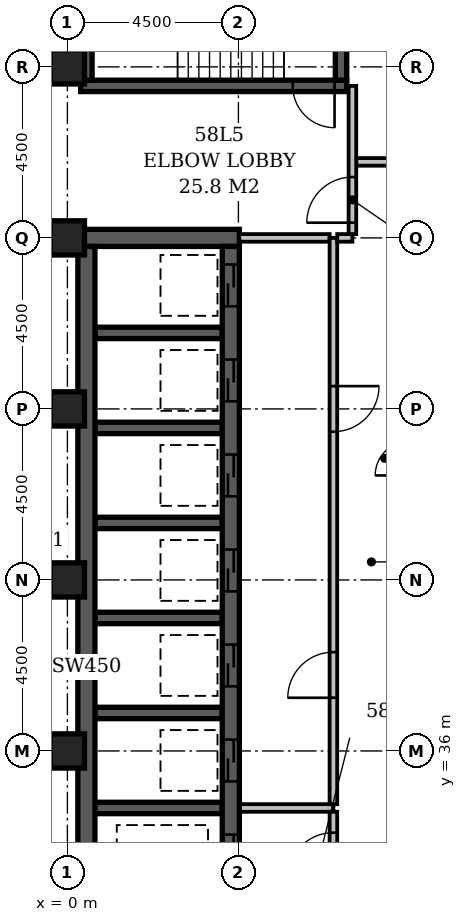
"""IFC4 building model, lengths in metres.
Left out: names, types, materials, properties, quantities, classifications, styles, units other than length and angle.
Written with IfcOpenShell. Run it as: python <this file> out.ifc"""

import sys

from ifc_helpers import new_model, si_unit, direction, frame, frame_2d, origin, origin_2d, place, context, subcontext, project, spatial, rectangle, extrude, element, fill, save


model = new_model("IFC4")
c1 = context("Model", 3, precision=1e-05, world=origin(), true_north=direction((0.0, 1.0)))
c2 = subcontext(c1, "Body", "Model", "MODEL_VIEW")
j1 = project(units=[si_unit("LENGTHUNIT", "METRE"), si_unit("PLANEANGLEUNIT", "RADIAN")], contexts=[c1])
p1 = place(None, origin())
s1 = spatial("IfcSite", under=j1, at=p1, CompositionType="ELEMENT")
p2 = place(p1, origin())
s2 = spatial("IfcBuilding", under=s1, at=p2, CompositionType="ELEMENT")
p3 = place(p2, frame((0.0, 0.0, 225.8)))
s3 = spatial("IfcBuildingStorey", under=s2, at=p3, CompositionType="ELEMENT", Elevation=225.8)
p4 = place(p3, frame((0.275, 49.5, -0.3), z_axis=(0.0, 0.0, 1.0), x_axis=(1.0, 0.0, 0.0)))
e1 = element("IfcWall", 1, at=p4, inside=s3, PredefinedType="SHEAR", context=c2, shape_type="SweptSolid", body=[
    extrude(rectangle(XDim=4.25, YDim=0.45, at=frame_2d((2.125, 0.0))), origin(), (0.0, 0.0, 1.0), 3.6),
])
p5 = place(p3, frame((0.35, 53.5, -0.3), z_axis=(0.0, 0.0, 1.0), x_axis=(1.0, 0.0, 0.0)))
e2 = element("IfcWall", 2, at=p5, inside=s3, PredefinedType="SHEAR", context=c2, shape_type="SweptSolid", body=[
    extrude(rectangle(XDim=7.0, YDim=0.3, at=frame_2d((3.5, 0.0))), origin(), (0.0, 0.0, 1.0), 3.6),
])
p6 = place(p5, frame((5.58, 0.0, 0.3)))
e3 = element("IfcOpeningElement", 3, at=p6, cuts=e2, PredefinedType="OPENING", context=c2, shape_type="SweptSolid", body=[
    extrude(rectangle(XDim=1.1, YDim=2.1, at=frame_2d((0.55, 1.05))), frame((0.0, 0.162, 0.0), z_axis=(0.0, -1.0, 0.0), x_axis=(1.0, 0.0, 0.0)), (0.0, 0.0, 1.0), 0.324),
])
p7 = place(p3, frame((0.5, 27.15, -0.3), z_axis=(0.0, 0.0, 1.0), x_axis=(0.0, 1.0, 0.0)))
e4 = element("IfcWall", 4, at=p7, inside=s3, PredefinedType="SHEAR", context=c2, shape_type="SweptSolid", body=[
    extrude(rectangle(XDim=22.125, YDim=0.45, at=frame_2d((11.062, 0.0))), origin(), (0.0, 0.0, 1.0), 3.6),
])
p8 = place(p3, frame((0.5, 53.65, -0.3), z_axis=(0.0, 0.0, 1.0), x_axis=(0.0, 1.0, 0.0)))
e5 = element("IfcWall", 5, at=p8, inside=s3, PredefinedType="SHEAR", context=c2, shape_type="SweptSolid", body=[
    extrude(rectangle(XDim=4.2, YDim=0.3, at=frame_2d((2.1, 0.0))), origin(), (0.0, 0.0, 1.0), 3.6),
])
for number, where, z_axis, x_axis in (
    (6, (0.725, 34.5, -0.3), (0.0, 0.0, 1.0), (1.0, 0.0, 0.0)),
    (7, (0.725, 37.0, -0.3), (0.0, 0.0, 1.0), (1.0, 0.0, 0.0)),
    (8, (0.725, 39.5, -0.3), (0.0, 0.0, 1.0), (1.0, 0.0, 0.0)),
    (9, (0.725, 42.0, -0.3), (0.0, 0.0, 1.0), (1.0, 0.0, 0.0)),
    (10, (0.725, 44.5, -0.3), (0.0, 0.0, 1.0), (1.0, 0.0, 0.0)),
    (11, (0.725, 47.0, -0.3), (0.0, 0.0, 1.0), (1.0, 0.0, 0.0)),
):
    element("IfcWall", number, at=place(p3, frame(where, z_axis=z_axis, x_axis=x_axis)), inside=s3, PredefinedType="SHEAR", context=c2, shape_type="SweptSolid", body=[
        extrude(rectangle(XDim=3.35, YDim=0.3, at=frame_2d((1.675, 0.0))), origin(), (0.0, 0.0, 1.0), 3.6),
    ])
p9 = place(p3, frame((4.3, 27.15, -0.3), z_axis=(0.0, 0.0, 1.0), x_axis=(0.0, 1.0, 0.0)))
e12 = element("IfcWall", 12, at=p9, inside=s3, PredefinedType="SHEAR", context=c2, shape_type="SweptSolid", body=[
    extrude(rectangle(XDim=22.125, YDim=0.45, at=frame_2d((11.062, 0.0))), origin(), (0.0, 0.0, 1.0), 3.6),
])
p10 = place(p9, frame((3.05, 0.0, 0.3)))
e13 = element("IfcOpeningElement", 13, at=p10, cuts=e12, PredefinedType="OPENING", context=c2, shape_type="SweptSolid", body=[
    extrude(rectangle(XDim=1.1, YDim=2.1, at=frame_2d((0.55, 1.05))), frame((0.0, 0.237, 0.0), z_axis=(0.0, -1.0, 0.0), x_axis=(1.0, 0.0, 0.0)), (0.0, 0.0, 1.0), 0.474),
])
p11 = place(p9, frame((0.55, 0.0, 0.3)))
e14 = element("IfcOpeningElement", 14, at=p11, cuts=e12, PredefinedType="OPENING", context=c2, shape_type="SweptSolid", body=[
    extrude(rectangle(XDim=1.1, YDim=2.1, at=frame_2d((0.55, 1.05))), frame((0.0, 0.237, 0.0), z_axis=(0.0, -1.0, 0.0), x_axis=(1.0, 0.0, 0.0)), (0.0, 0.0, 1.0), 0.474),
])
p12 = place(p9, frame((20.55, 0.0, 0.3)))
e15 = element("IfcOpeningElement", 15, at=p12, cuts=e12, PredefinedType="OPENING", context=c2, shape_type="SweptSolid", body=[
    extrude(rectangle(XDim=1.1, YDim=2.1, at=frame_2d((0.55, 1.05))), frame((0.0, 0.237, 0.0), z_axis=(0.0, -1.0, 0.0), x_axis=(1.0, 0.0, 0.0)), (0.0, 0.0, 1.0), 0.474),
])
p13 = place(p9, frame((18.05, 0.0, 0.3)))
e16 = element("IfcOpeningElement", 16, at=p13, cuts=e12, PredefinedType="OPENING", context=c2, shape_type="SweptSolid", body=[
    extrude(rectangle(XDim=1.1, YDim=2.1, at=frame_2d((0.55, 1.05))), frame((0.0, 0.237, 0.0), z_axis=(0.0, -1.0, 0.0), x_axis=(1.0, 0.0, 0.0)), (0.0, 0.0, 1.0), 0.474),
])
p14 = place(p9, frame((15.55, 0.0, 0.3)))
e17 = element("IfcOpeningElement", 17, at=p14, cuts=e12, PredefinedType="OPENING", context=c2, shape_type="SweptSolid", body=[
    extrude(rectangle(XDim=1.1, YDim=2.1, at=frame_2d((0.55, 1.05))), frame((0.0, 0.237, 0.0), z_axis=(0.0, -1.0, 0.0), x_axis=(1.0, 0.0, 0.0)), (0.0, 0.0, 1.0), 0.474),
])
p15 = place(p9, frame((13.05, 0.0, 0.3)))
e18 = element("IfcOpeningElement", 18, at=p15, cuts=e12, PredefinedType="OPENING", context=c2, shape_type="SweptSolid", body=[
    extrude(rectangle(XDim=1.1, YDim=2.1, at=frame_2d((0.55, 1.05))), frame((0.0, 0.237, 0.0), z_axis=(0.0, -1.0, 0.0), x_axis=(1.0, 0.0, 0.0)), (0.0, 0.0, 1.0), 0.474),
])
p16 = place(p9, frame((10.55, 0.0, 0.3)))
e19 = element("IfcOpeningElement", 19, at=p16, cuts=e12, PredefinedType="OPENING", context=c2, shape_type="SweptSolid", body=[
    extrude(rectangle(XDim=1.1, YDim=2.1, at=frame_2d((0.55, 1.05))), frame((0.0, 0.237, 0.0), z_axis=(0.0, -1.0, 0.0), x_axis=(1.0, 0.0, 0.0)), (0.0, 0.0, 1.0), 0.474),
])
p17 = place(p9, frame((8.05, 0.0, 0.3)))
e20 = element("IfcOpeningElement", 20, at=p17, cuts=e12, PredefinedType="OPENING", context=c2, shape_type="SweptSolid", body=[
    extrude(rectangle(XDim=1.1, YDim=2.1, at=frame_2d((0.55, 1.05))), frame((0.0, 0.237, 0.0), z_axis=(0.0, -1.0, 0.0), x_axis=(1.0, 0.0, 0.0)), (0.0, 0.0, 1.0), 0.474),
])
p18 = place(p9, frame((5.55, 0.0, 0.3)))
e21 = element("IfcOpeningElement", 21, at=p18, cuts=e12, PredefinedType="OPENING", context=c2, shape_type="SweptSolid", body=[
    extrude(rectangle(XDim=1.1, YDim=2.1, at=frame_2d((0.55, 1.05))), frame((0.0, 0.237, 0.0), z_axis=(0.0, -1.0, 0.0), x_axis=(1.0, 0.0, 0.0)), (0.0, 0.0, 1.0), 0.474),
])
p19 = place(p3, frame((7.2, 53.65, -0.3), z_axis=(0.0, 0.0, 1.0), x_axis=(0.0, 1.0, 0.0)))
e22 = element("IfcWall", 22, at=p19, inside=s3, PredefinedType="SHEAR", context=c2, shape_type="SweptSolid", body=[
    extrude(rectangle(XDim=4.2, YDim=0.3, at=frame_2d((2.1, 0.0))), origin(), (0.0, 0.0, 1.0), 3.6),
])
for number, where, z_axis, x_axis in (
    (23, (0.0, 36.0, -0.3), (0.0, 0.0, 1.0), (1.0, 0.0, 0.0)),
    (24, (0.0, 40.5, -0.3), (0.0, 0.0, 1.0), (1.0, 0.0, 0.0)),
    (25, (0.0, 45.0, -0.3), (0.0, 0.0, 1.0), (1.0, 0.0, 0.0)),
    (26, (0.0, 49.5, -0.3), (0.0, 0.0, 1.0), (1.0, 0.0, 0.0)),
    (27, (0.0, 54.0, -0.3), (0.0, 0.0, 1.0), (1.0, 0.0, 0.0)),
):
    element("IfcColumn", number, at=place(p3, frame(where, z_axis=z_axis, x_axis=x_axis)), inside=s3, PredefinedType="COLUMN", context=c2, shape_type="SweptSolid", body=[
        extrude(rectangle(XDim=0.9, YDim=0.9, at=origin_2d()), origin(), (0.0, 0.0, 1.0), 3.6),
    ])
p20 = place(p3, frame((4.545, 34.5, 0.0), z_axis=(0.0, 0.0, 1.0), x_axis=(1.0, 0.0, 0.0)))
e28 = element("IfcWall", 28, at=p20, inside=s3, PredefinedType="PARTITIONING", context=c2, shape_type="SweptSolid", body=[
    extrude(rectangle(XDim=2.455, YDim=0.2, at=frame_2d((1.228, 0.0))), origin(), (0.0, 0.0, 1.0), 3.3),
])
p21 = place(p3, frame((7.0, 34.6, 0.0), z_axis=(0.0, 0.0, 1.0), x_axis=(0.0, 1.0, 0.0)))
e29 = element("IfcWall", 29, at=p21, inside=s3, PredefinedType="PARTITIONING", context=c2, shape_type="SweptSolid", body=[
    extrude(rectangle(XDim=14.9, YDim=0.2, at=frame_2d((7.45, 0.0))), origin(), (0.0, 0.0, 1.0), 3.3),
])
p22 = place(p21, frame((2.8, 0.0, 0.0)))
e30 = element("IfcOpeningElement", 30, at=p22, cuts=e29, PredefinedType="OPENING", context=c2, shape_type="SweptSolid", body=[
    extrude(rectangle(XDim=1.2, YDim=2.1, at=frame_2d((0.6, 1.05))), frame((0.0, 0.112, 0.0), z_axis=(0.0, -1.0, 0.0), x_axis=(1.0, 0.0, 0.0)), (0.0, 0.0, 1.0), 0.224),
])
p23 = place(p21, frame((9.8, 0.0, 0.0)))
e31 = element("IfcOpeningElement", 31, at=p23, cuts=e29, PredefinedType="OPENING", context=c2, shape_type="SweptSolid", body=[
    extrude(rectangle(XDim=1.2, YDim=2.1, at=frame_2d((0.6, 1.05))), frame((0.0, 0.112, 0.0), z_axis=(0.0, -1.0, 0.0), x_axis=(1.0, 0.0, 0.0)), (0.0, 0.0, 1.0), 0.224),
])
p24 = place(p3, frame((4.525, 49.5, 0.0), z_axis=(0.0, 0.0, 1.0), x_axis=(1.0, 0.0, 0.0)))
e32 = element("IfcWall", 32, at=p24, inside=s3, PredefinedType="PARTITIONING", context=c2, shape_type="SweptSolid", body=[
    extrude(rectangle(XDim=2.375, YDim=0.2, at=frame_2d((1.188, 0.0))), origin(), (0.0, 0.0, 1.0), 3.3),
])
p25 = place(p3, frame((7.0, 32.1, 0.0), z_axis=(0.0, 0.0, 1.0), x_axis=(0.0, 1.0, 0.0)))
e33 = element("IfcWall", 33, at=p25, inside=s3, PredefinedType="PARTITIONING", context=c2, shape_type="SweptSolid", body=[
    extrude(rectangle(XDim=2.3, YDim=0.2, at=frame_2d((1.15, 0.0))), origin(), (0.0, 0.0, 1.0), 3.3),
])
p26 = place(p25, frame((0.55, 0.0, 0.0)))
e34 = element("IfcOpeningElement", 34, at=p26, cuts=e33, PredefinedType="OPENING", context=c2, shape_type="SweptSolid", body=[
    extrude(rectangle(XDim=1.2, YDim=2.1, at=frame_2d((0.6, 1.05))), frame((0.0, 0.112, 0.0), z_axis=(0.0, -1.0, 0.0), x_axis=(1.0, 0.0, 0.0)), (0.0, 0.0, 1.0), 0.224),
])
p27 = place(p3, frame((7.1, 49.5, 0.0), z_axis=(0.0, 0.0, 1.0), x_axis=(1.0, 0.0, 0.0)))
e35 = element("IfcWall", 35, at=p27, inside=s3, PredefinedType="PARTITIONING", context=c2, shape_type="SweptSolid", body=[
    extrude(rectangle(XDim=0.4, YDim=0.2, at=frame_2d((0.2, 0.0))), origin(), (0.0, 0.0, 1.0), 3.3),
])
p28 = place(p3, frame((7.5, 49.6, 0.0), z_axis=(0.0, 0.0, 1.0), x_axis=(0.0, 1.0, 0.0)))
e36 = element("IfcWall", 36, at=p28, inside=s3, PredefinedType="PARTITIONING", context=c2, shape_type="SweptSolid", body=[
    extrude(rectangle(XDim=3.9, YDim=0.2, at=frame_2d((1.95, 0.0))), origin(), (0.0, 0.0, 1.0), 3.3),
])
p29 = place(p28, frame((0.3, 0.0, 0.0)))
e37 = element("IfcOpeningElement", 37, at=p29, cuts=e36, PredefinedType="OPENING", context=c2, shape_type="SweptSolid", body=[
    extrude(rectangle(XDim=1.2, YDim=2.1, at=frame_2d((0.6, 1.05))), frame((0.0, 0.112, 0.0), z_axis=(0.0, -1.0, 0.0), x_axis=(1.0, 0.0, 0.0)), (0.0, 0.0, 1.0), 0.224),
])
p30 = place(p3, frame((7.6, 51.5, 0.0), z_axis=(0.0, 0.0, 1.0), x_axis=(1.0, 0.0, 0.0)))
e38 = element("IfcWall", 38, at=p30, inside=s3, PredefinedType="PARTITIONING", context=c2, shape_type="SweptSolid", body=[
    extrude(rectangle(XDim=15.3, YDim=0.2, at=frame_2d((7.65, 0.0))), origin(), (0.0, 0.0, 1.0), 3.3),
])
p31 = place(p30, frame((3.55, 0.0, 0.0)))
e39 = element("IfcOpeningElement", 39, at=p31, cuts=e38, PredefinedType="OPENING", context=c2, shape_type="SweptSolid", body=[
    extrude(rectangle(XDim=0.9, YDim=2.1, at=frame_2d((0.45, 1.05))), frame((0.0, 0.112, 0.0), z_axis=(0.0, -1.0, 0.0), x_axis=(1.0, 0.0, 0.0)), (0.0, 0.0, 1.0), 0.224),
])
p32 = place(p30, frame((11.3, 0.0, 0.0)))
e40 = element("IfcOpeningElement", 40, at=p32, cuts=e38, PredefinedType="OPENING", context=c2, shape_type="SweptSolid", body=[
    extrude(rectangle(XDim=0.9, YDim=2.1, at=frame_2d((0.45, 1.05))), frame((0.0, 0.112, 0.0), z_axis=(0.0, -1.0, 0.0), x_axis=(1.0, 0.0, 0.0)), (0.0, 0.0, 1.0), 0.224),
])
p33 = place(p29, origin())
e41 = element("IfcDoor", 41, at=p33, inside=s3, OperationType="SINGLE_SWING_LEFT", PredefinedType="DOOR", context=c2, shape_type="SweptSolid", body=[
    extrude(rectangle(XDim=1.2, YDim=2.1, at=frame_2d((0.6, 1.05))), frame((0.0, 0.025, 0.0), z_axis=(0.0, -1.0, 0.0), x_axis=(1.0, 0.0, 0.0)), (0.0, 0.0, 1.0), 0.05),
])
fill(e37, e41)
p34 = place(p12, origin())
e42 = element("IfcDoor", 42, at=p34, inside=s3, OperationType="SLIDING_TO_LEFT", PredefinedType="DOOR", context=c2, shape_type="SweptSolid", body=[
    extrude(rectangle(XDim=1.1, YDim=2.1, at=frame_2d((0.55, 1.05))), frame((0.0, 0.025, 0.0), z_axis=(0.0, -1.0, 0.0), x_axis=(1.0, 0.0, 0.0)), (0.0, 0.0, 1.0), 0.05),
])
fill(e15, e42)
p35 = place(p13, origin())
e43 = element("IfcDoor", 43, at=p35, inside=s3, OperationType="SLIDING_TO_LEFT", PredefinedType="DOOR", context=c2, shape_type="SweptSolid", body=[
    extrude(rectangle(XDim=1.1, YDim=2.1, at=frame_2d((0.55, 1.05))), frame((0.0, 0.025, 0.0), z_axis=(0.0, -1.0, 0.0), x_axis=(1.0, 0.0, 0.0)), (0.0, 0.0, 1.0), 0.05),
])
fill(e16, e43)
p36 = place(p14, origin())
e44 = element("IfcDoor", 44, at=p36, inside=s3, OperationType="SLIDING_TO_LEFT", PredefinedType="DOOR", context=c2, shape_type="SweptSolid", body=[
    extrude(rectangle(XDim=1.1, YDim=2.1, at=frame_2d((0.55, 1.05))), frame((0.0, 0.025, 0.0), z_axis=(0.0, -1.0, 0.0), x_axis=(1.0, 0.0, 0.0)), (0.0, 0.0, 1.0), 0.05),
])
fill(e17, e44)
p37 = place(p15, origin())
e45 = element("IfcDoor", 45, at=p37, inside=s3, OperationType="SLIDING_TO_LEFT", PredefinedType="DOOR", context=c2, shape_type="SweptSolid", body=[
    extrude(rectangle(XDim=1.1, YDim=2.1, at=frame_2d((0.55, 1.05))), frame((0.0, 0.025, 0.0), z_axis=(0.0, -1.0, 0.0), x_axis=(1.0, 0.0, 0.0)), (0.0, 0.0, 1.0), 0.05),
])
fill(e18, e45)
p38 = place(p16, origin())
e46 = element("IfcDoor", 46, at=p38, inside=s3, OperationType="SLIDING_TO_LEFT", PredefinedType="DOOR", context=c2, shape_type="SweptSolid", body=[
    extrude(rectangle(XDim=1.1, YDim=2.1, at=frame_2d((0.55, 1.05))), frame((0.0, 0.025, 0.0), z_axis=(0.0, -1.0, 0.0), x_axis=(1.0, 0.0, 0.0)), (0.0, 0.0, 1.0), 0.05),
])
fill(e19, e46)
p39 = place(p17, origin())
e47 = element("IfcDoor", 47, at=p39, inside=s3, OperationType="SLIDING_TO_LEFT", PredefinedType="DOOR", context=c2, shape_type="SweptSolid", body=[
    extrude(rectangle(XDim=1.1, YDim=2.1, at=frame_2d((0.55, 1.05))), frame((0.0, 0.025, 0.0), z_axis=(0.0, -1.0, 0.0), x_axis=(1.0, 0.0, 0.0)), (0.0, 0.0, 1.0), 0.05),
])
fill(e20, e47)
p40 = place(p22, origin())
e48 = element("IfcDoor", 48, at=p40, inside=s3, OperationType="SINGLE_SWING_LEFT", PredefinedType="DOOR", context=c2, shape_type="SweptSolid", body=[
    extrude(rectangle(XDim=1.2, YDim=2.1, at=frame_2d((0.6, 1.05))), frame((0.0, 0.025, 0.0), z_axis=(0.0, -1.0, 0.0), x_axis=(1.0, 0.0, 0.0)), (0.0, 0.0, 1.0), 0.05),
])
fill(e30, e48)
p41 = place(p23, origin())
e49 = element("IfcDoor", 49, at=p41, inside=s3, OperationType="SINGLE_SWING_RIGHT", PredefinedType="DOOR", context=c2, shape_type="SweptSolid", body=[
    extrude(rectangle(XDim=1.2, YDim=2.1, at=frame_2d((0.6, 1.05))), frame((0.0, 0.025, 0.0), z_axis=(0.0, -1.0, 0.0), x_axis=(1.0, 0.0, 0.0)), (0.0, 0.0, 1.0), 0.05),
])
fill(e31, e49)
p42 = place(p26, origin())
e50 = element("IfcDoor", 50, at=p42, inside=s3, OperationType="SINGLE_SWING_LEFT", PredefinedType="DOOR", context=c2, shape_type="SweptSolid", body=[
    extrude(rectangle(XDim=1.2, YDim=2.1, at=frame_2d((0.6, 1.05))), frame((0.0, 0.025, 0.0), z_axis=(0.0, -1.0, 0.0), x_axis=(1.0, 0.0, 0.0)), (0.0, 0.0, 1.0), 0.05),
])
fill(e34, e50)
p43 = place(p18, origin())
e51 = element("IfcDoor", 51, at=p43, inside=s3, OperationType="SLIDING_TO_LEFT", PredefinedType="DOOR", context=c2, shape_type="SweptSolid", body=[
    extrude(rectangle(XDim=1.1, YDim=2.1, at=frame_2d((0.55, 1.05))), frame((0.0, 0.025, 0.0), z_axis=(0.0, -1.0, 0.0), x_axis=(1.0, 0.0, 0.0)), (0.0, 0.0, 1.0), 0.05),
])
fill(e21, e51)
p44 = place(p6, origin())
e52 = element("IfcDoor", 52, at=p44, inside=s3, OperationType="SINGLE_SWING_RIGHT", PredefinedType="DOOR", context=c2, shape_type="SweptSolid", body=[
    extrude(rectangle(XDim=1.1, YDim=2.1, at=frame_2d((0.55, 1.05))), frame((0.0, 0.025, 0.0), z_axis=(0.0, -1.0, 0.0), x_axis=(1.0, 0.0, 0.0)), (0.0, 0.0, 1.0), 0.05),
])
fill(e3, e52)
save(model, sys.argv[1])
